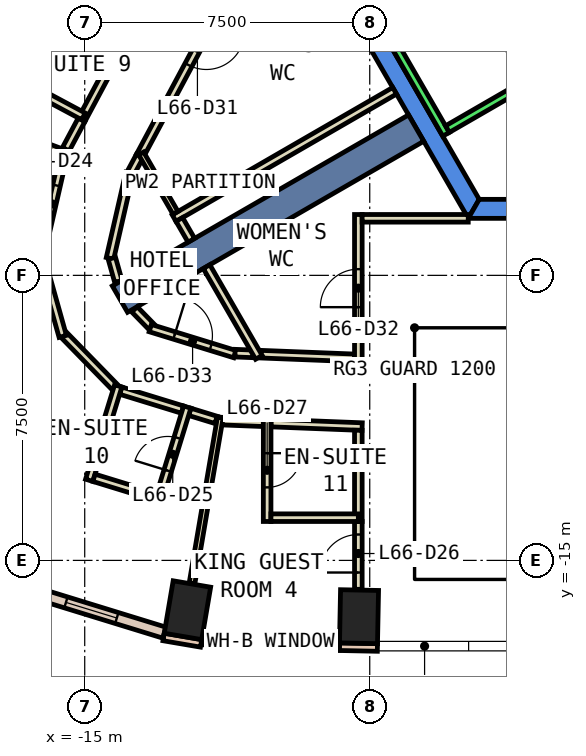
"""IFC4 building model, lengths in metres.
Left out: names, types, materials, properties, quantities, classifications, styles, units other than length and angle.
Written with IfcOpenShell. Run it as: python <this file> out.ifc"""

import sys

from ifc_helpers import new_model, si_unit, direction, frame, frame_2d, origin, origin_2d, place, context, subcontext, project, spatial, polyline, rectangle, outline, extrude, element, fill, save


model = new_model("IFC4")
c1 = context("Model", 3, precision=1e-05, world=origin(), true_north=direction((0.0, 1.0)))
c2 = subcontext(c1, "Body", "Model", "MODEL_VIEW")
j1 = project(units=[si_unit("LENGTHUNIT", "METRE"), si_unit("PLANEANGLEUNIT", "RADIAN")], contexts=[c1])
p1 = place(None, origin())
s1 = spatial("IfcSite", under=j1, at=p1, CompositionType="ELEMENT")
p2 = place(p1, origin())
s2 = spatial("IfcBuilding", under=s1, at=p2, CompositionType="ELEMENT")
p3 = place(p2, frame((0.0, 0.0, 286.4)))
s3 = spatial("IfcBuildingStorey", under=s2, at=p3, CompositionType="ELEMENT", Elevation=286.4)
for number, where, z_axis, x_axis in (
    (1, (-12.297, -16.311, 0.0), (0.0, 0.0, 1.0), (-0.986, 0.168, 0.0)),
    (2, (-7.782, -16.481, 0.0), (0.0, 0.0, 1.0), (-1.0, 0.02, 0.0)),
):
    element("IfcColumn", number, at=place(p3, frame(where, z_axis=z_axis, x_axis=x_axis)), inside=s3, PredefinedType="COLUMN", context=c2, shape_type="SweptSolid", body=[
        extrude(rectangle(XDim=1.0, YDim=1.4, at=origin_2d()), origin(), (0.0, 0.0, 1.0), 3.26),
    ])
p4 = place(p3, frame((0.0, 0.0, -0.6)))
e3 = element("IfcWall", 3, at=p4, inside=s3, PredefinedType="SHEAR", context=c2, shape_type="SweptSolid", body=[
    extrude(outline(polyline([(-9.815, 2.5), (-4.907, -6.0), (-4.619, -5.5), (-9.238, 2.5), (-9.815, 2.5)])), origin(), (0.0, 0.0, 1.0), 3.86),
])
p5 = place(p3, frame((0.0, 0.0, -0.6)))
e4 = element("IfcWall", 4, at=p5, inside=s3, PredefinedType="SHEAR", context=c2, shape_type="SweptSolid", body=[
    extrude(outline(polyline([(3.75, -6.0), (3.75, -5.5), (-4.619, -5.5), (-4.907, -6.0), (3.75, -6.0)])), origin(), (0.0, 0.0, 1.0), 3.86),
])
p6 = place(p3, frame((-6.279, -3.625, -0.6), z_axis=(0.0, 0.0, 1.0), x_axis=(-0.866017533419, -0.500013631625, 0.0)))
e5 = element("IfcWall", 5, at=p6, inside=s3, PredefinedType="SHEAR", context=c2, shape_type="SweptSolid", body=[
    extrude(rectangle(XDim=9.0, YDim=0.8, at=frame_2d((4.5, 0.0))), origin(), (0.0, 0.0, 1.0), 3.86),
])
for number, where, z_axis, x_axis in (
    (6, (-12.924, -17.015, 0.0), (0.0, 0.0, 1.0), (0.986, -0.168, 0.0)),
    (7, (-8.298, -17.271, 0.0), (0.0, 0.0, 1.0), (1.0, -0.02, 0.0)),
):
    element("IfcWall", number, at=place(p3, frame(where, z_axis=z_axis, x_axis=x_axis)), inside=s3, PredefinedType="STANDARD", context=c2, shape_type="SweptSolid", body=[
        extrude(rectangle(XDim=1.0, YDim=0.2, at=frame_2d((0.5, 0.0))), origin(), (0.0, 0.0, 1.0), 3.26),
    ])
p7 = place(p3, frame((-11.92, -17.069, 0.0), z_axis=(0.0, 0.0, 1.0), x_axis=(0.999234893779, -0.039110446866, 0.0)))
e8 = element("IfcWall", 8, at=p7, inside=s3, PredefinedType="STANDARD", context=c2, shape_type="SweptSolid", body=[
    extrude(rectangle(XDim=3.627, YDim=0.3, at=frame_2d((1.813, 0.0))), origin(), (0.0, 0.0, 1.0), 3.26),
])
p8 = place(p7, frame((1.113, 0.0, 0.9)))
e9 = element("IfcOpeningElement", 9, at=p8, cuts=e8, PredefinedType="OPENING", context=c2, shape_type="SweptSolid", body=[
    extrude(rectangle(XDim=1.4, YDim=2.0, at=frame_2d((0.7, 1.0))), frame((0.0, 0.16, 0.0), z_axis=(0.0, -1.0, 0.0), x_axis=(1.0, 0.0, 0.0)), (0.0, 0.0, 1.0), 0.32),
])
p9 = place(p3, frame((-16.746, -15.72, 0.0), z_axis=(0.0, 0.0, 1.0), x_axis=(0.955866957005, -0.293799864716, 0.0)))
e10 = element("IfcWall", 10, at=p9, inside=s3, PredefinedType="STANDARD", context=c2, shape_type="SweptSolid", body=[
    extrude(rectangle(XDim=4.02, YDim=0.3, at=frame_2d((2.01, 0.0))), origin(), (0.0, 0.0, 1.0), 3.26),
])
p10 = place(p9, frame((1.31, 0.0, 0.9)))
e11 = element("IfcOpeningElement", 11, at=p10, cuts=e10, PredefinedType="OPENING", context=c2, shape_type="SweptSolid", body=[
    extrude(rectangle(XDim=1.4, YDim=2.0, at=frame_2d((0.7, 1.0))), frame((0.0, 0.16, 0.0), z_axis=(0.0, -1.0, 0.0), x_axis=(1.0, 0.0, 0.0)), (0.0, 0.0, 1.0), 0.32),
])
p11 = place(p3, frame((-10.639, 1.084, 0.0), z_axis=(0.0, 0.0, 1.0), x_axis=(-0.471696599276, -0.881760918975, 0.0)))
e12 = element("IfcWall", 12, at=p11, inside=s3, PredefinedType="PARTITIONING", context=c2, shape_type="SweptSolid", body=[
    extrude(rectangle(XDim=6.172, YDim=0.2, at=frame_2d((3.086, 0.0))), origin(), (0.0, 0.0, 1.0), 3.26),
])
p12 = place(p11, frame((2.458, 0.0, 0.0)))
e13 = element("IfcOpeningElement", 13, at=p12, cuts=e12, PredefinedType="OPENING", context=c2, shape_type="SweptSolid", body=[
    extrude(rectangle(XDim=1.0, YDim=2.1, at=frame_2d((0.5, 1.05))), frame((0.0, 0.11, 0.0), z_axis=(0.0, -1.0, 0.0), x_axis=(1.0, 0.0, 0.0)), (0.0, 0.0, 1.0), 0.22),
])
p13 = place(p3, frame((-10.367, -9.574, 0.0), z_axis=(0.0, 0.0, 1.0), x_axis=(0.999229139158, -0.039257196264, 0.0)))
e14 = element("IfcWall", 14, at=p13, inside=s3, PredefinedType="PARTITIONING", context=c2, shape_type="SweptSolid", body=[
    extrude(rectangle(XDim=2.469, YDim=0.2, at=frame_2d((1.234, 0.0))), origin(), (0.0, 0.0, 1.0), 3.26),
])
p14 = place(p3, frame((-13.55, -4.358, 0.0), z_axis=(0.0, 0.0, 1.0), x_axis=(-0.472169364753, -0.881507850781, 0.0)))
e15 = element("IfcWall", 15, at=p14, inside=s3, PredefinedType="PARTITIONING", context=c2, shape_type="SweptSolid", body=[
    extrude(rectangle(XDim=0.521, YDim=0.2, at=frame_2d((0.26, 0.0))), origin(), (0.0, 0.0, 1.0), 3.26),
])
p15 = place(p3, frame((-13.821, -4.808, 0.0), z_axis=(0.0, 0.0, 1.0), x_axis=(-0.223248099856, -0.97476165595, 0.0)))
e16 = element("IfcWall", 16, at=p15, inside=s3, PredefinedType="PARTITIONING", context=c2, shape_type="SweptSolid", body=[
    extrude(rectangle(XDim=2.302, YDim=0.2, at=frame_2d((1.151, 0.0))), origin(), (0.0, 0.0, 1.0), 3.26),
])
p16 = place(p3, frame((-14.286, -7.051, 0.0), z_axis=(0.0, 0.0, 1.0), x_axis=(0.270633612894, -0.96268242301, 0.0)))
e17 = element("IfcWall", 17, at=p16, inside=s3, PredefinedType="PARTITIONING", context=c2, shape_type="SweptSolid", body=[
    extrude(rectangle(XDim=0.632, YDim=0.2, at=frame_2d((0.316, 0.0))), origin(), (0.0, 0.0, 1.0), 3.26),
])
p17 = place(p3, frame((-13.69, -8.395, 0.0), z_axis=(0.0, 0.0, 1.0), x_axis=(0.698333537371, -0.715772499181, 0.0)))
e18 = element("IfcWall", 18, at=p17, inside=s3, PredefinedType="PARTITIONING", context=c2, shape_type="SweptSolid", body=[
    extrude(rectangle(XDim=0.63, YDim=0.2, at=frame_2d((0.315, 0.0))), origin(), (0.0, 0.0, 1.0), 3.26),
])
p18 = place(p3, frame((-13.275, -8.888, 0.0), z_axis=(0.0, 0.0, 1.0), x_axis=(0.955792602122, -0.294041666654, 0.0)))
e19 = element("IfcWall", 19, at=p18, inside=s3, PredefinedType="PARTITIONING", context=c2, shape_type="SweptSolid", body=[
    extrude(rectangle(XDim=2.33, YDim=0.2, at=frame_2d((1.165, 0.0))), origin(), (0.0, 0.0, 1.0), 3.26),
])
p19 = place(p18, frame((0.665, 0.0, 0.0)))
e20 = element("IfcOpeningElement", 20, at=p19, cuts=e19, PredefinedType="OPENING", context=c2, shape_type="SweptSolid", body=[
    extrude(rectangle(XDim=1.0, YDim=2.1, at=frame_2d((0.5, 1.05))), frame((0.0, 0.11, 0.0), z_axis=(0.0, -1.0, 0.0), x_axis=(1.0, 0.0, 0.0)), (0.0, 0.0, 1.0), 0.22),
])
p20 = place(p3, frame((-11.044, -9.547, 0.0), z_axis=(0.0, 0.0, 1.0), x_axis=(0.999224473046, -0.039375785274, 0.0)))
e21 = element("IfcWall", 21, at=p20, inside=s3, PredefinedType="PARTITIONING", context=c2, shape_type="SweptSolid", body=[
    extrude(rectangle(XDim=0.478, YDim=0.2, at=frame_2d((0.239, 0.0))), origin(), (0.0, 0.0, 1.0), 3.26),
])
p21 = place(p3, frame((-15.496, -4.18, 0.0), z_axis=(0.0, 0.0, 1.0), x_axis=(0.471280380621, 0.881983448167, 0.0)))
e22 = element("IfcWall", 22, at=p21, inside=s3, PredefinedType="PARTITIONING", context=c2, shape_type="SweptSolid", body=[
    extrude(rectangle(XDim=0.879, YDim=0.2, at=frame_2d((0.439, 0.0))), origin(), (0.0, 0.0, 1.0), 3.26),
])
p22 = place(p3, frame((-15.082, -3.405, 0.0), z_axis=(0.0, 0.0, 1.0), x_axis=(0.471719946084, 0.88174842924, 0.0)))
e23 = element("IfcWall", 23, at=p22, inside=s3, PredefinedType="PARTITIONING", context=c2, shape_type="SweptSolid", body=[
    extrude(rectangle(XDim=3.0, YDim=0.2, at=frame_2d((1.5, 0.0))), origin(), (0.0, 0.0, 1.0), 3.26),
])
p23 = place(p3, frame((-11.544, -11.303, 0.0), z_axis=(0.0, 0.0, 1.0), x_axis=(-0.956186468463, 0.292758326147, 0.0)))
e24 = element("IfcWall", 24, at=p23, inside=s3, PredefinedType="PARTITIONING", context=c2, shape_type="SweptSolid", body=[
    extrude(rectangle(XDim=0.724, YDim=0.2, at=frame_2d((0.362, 0.0))), origin(), (0.0, 0.0, 1.0), 3.26),
])
p24 = place(p3, frame((-14.147, -10.503, 0.0), z_axis=(0.0, 0.0, 1.0), x_axis=(-0.698515752779, 0.715594677957, 0.0)))
e25 = element("IfcWall", 25, at=p24, inside=s3, PredefinedType="PARTITIONING", context=c2, shape_type="SweptSolid", body=[
    extrude(rectangle(XDim=1.987, YDim=0.2, at=frame_2d((0.994, 0.0))), origin(), (0.0, 0.0, 1.0), 3.26),
])
p25 = place(p3, frame((-15.578, -9.106, 0.0), z_axis=(0.0, 0.0, 1.0), x_axis=(-0.270688011946, 0.962667128445, 0.0)))
e26 = element("IfcWall", 26, at=p25, inside=s3, PredefinedType="PARTITIONING", context=c2, shape_type="SweptSolid", body=[
    extrude(rectangle(XDim=2.088, YDim=0.2, at=frame_2d((1.044, 0.0))), origin(), (0.0, 0.0, 1.0), 3.26),
])
p26 = place(p3, frame((-16.192, -7.098, 0.0), z_axis=(0.0, 0.0, 1.0), x_axis=(0.22330023395, 0.974749714295, 0.0)))
e27 = element("IfcWall", 27, at=p26, inside=s3, PredefinedType="PARTITIONING", context=c2, shape_type="SweptSolid", body=[
    extrude(rectangle(XDim=2.928, YDim=0.2, at=frame_2d((1.464, 0.0))), origin(), (0.0, 0.0, 1.0), 3.26),
])
p27 = place(p26, frame((1.014, 0.0, 0.0)))
e28 = element("IfcOpeningElement", 28, at=p27, cuts=e27, PredefinedType="OPENING", context=c2, shape_type="SweptSolid", body=[
    extrude(rectangle(XDim=1.0, YDim=2.1, at=frame_2d((0.5, 1.05))), frame((0.0, 0.11, 0.0), z_axis=(0.0, -1.0, 0.0), x_axis=(1.0, 0.0, 0.0)), (0.0, 0.0, 1.0), 0.22),
])
p28 = place(p3, frame((-12.427, -11.032, 0.0), z_axis=(0.0, 0.0, 1.0), x_axis=(-0.955940341053, 0.293561006177, 0.0)))
e29 = element("IfcWall", 29, at=p28, inside=s3, PredefinedType="PARTITIONING", context=c2, shape_type="SweptSolid", body=[
    extrude(rectangle(XDim=1.7, YDim=0.2, at=frame_2d((0.85, 0.0))), origin(), (0.0, 0.0, 1.0), 3.26),
])
p29 = place(p3, frame((-10.299, -11.378, 0.0), z_axis=(0.0, 0.0, 1.0), x_axis=(-0.999237995813, 0.03903111224, 0.0)))
e30 = element("IfcWall", 30, at=p29, inside=s3, PredefinedType="PARTITIONING", context=c2, shape_type="SweptSolid", body=[
    extrude(rectangle(XDim=1.176, YDim=0.2, at=frame_2d((0.588, 0.0))), origin(), (0.0, 0.0, 1.0), 3.26),
])
p30 = place(p3, frame((-7.7, -11.48, 0.0), z_axis=(0.0, 0.0, 1.0), x_axis=(-0.999233433291, 0.039147743138, 0.0)))
e31 = element("IfcWall", 31, at=p30, inside=s3, PredefinedType="PARTITIONING", context=c2, shape_type="SweptSolid", body=[
    extrude(rectangle(XDim=2.401, YDim=0.2, at=frame_2d((1.201, 0.0))), origin(), (0.0, 0.0, 1.0), 3.26),
])
p31 = place(p3, frame((-7.8, -9.775, 0.0), z_axis=(0.0, 0.0, 1.0), x_axis=(0.0, 1.0, 0.0)))
e32 = element("IfcWall", 32, at=p31, inside=s3, PredefinedType="PARTITIONING", context=c2, shape_type="SweptSolid", body=[
    extrude(rectangle(XDim=3.876, YDim=0.2, at=frame_2d((1.938, 0.0))), origin(), (0.0, 0.0, 1.0), 3.26),
])
p32 = place(p31, frame((1.438, 0.0, 0.0)))
e33 = element("IfcOpeningElement", 33, at=p32, cuts=e32, PredefinedType="OPENING", context=c2, shape_type="SweptSolid", body=[
    extrude(rectangle(XDim=1.0, YDim=2.1, at=frame_2d((0.5, 1.05))), frame((0.0, 0.11, 0.0), z_axis=(0.0, -1.0, 0.0), x_axis=(1.0, 0.0, 0.0)), (0.0, 0.0, 1.0), 0.22),
])
p33 = place(p3, frame((-7.7, -5.999, 0.0), z_axis=(0.0, 0.0, 1.0), x_axis=(1.0, 0.0, 0.0)))
e34 = element("IfcWall", 34, at=p33, inside=s3, PredefinedType="PARTITIONING", context=c2, shape_type="SweptSolid", body=[
    extrude(rectangle(XDim=2.792, YDim=0.2, at=frame_2d((1.396, 0.0))), origin(), (0.0, 0.0, 1.0), 3.26),
])
p34 = place(p3, frame((-7.8, -15.761, 0.0), z_axis=(0.0, 0.0, 1.0), x_axis=(0.0, 1.0, 0.0)))
e35 = element("IfcWall", 35, at=p34, inside=s3, PredefinedType="PARTITIONING", context=c2, shape_type="SweptSolid", body=[
    extrude(rectangle(XDim=1.785, YDim=0.2, at=frame_2d((0.893, 0.0))), origin(), (0.0, 0.0, 1.0), 3.26),
])
p35 = place(p34, frame((0.442, 0.0, 0.0)))
e36 = element("IfcOpeningElement", 36, at=p35, cuts=e35, PredefinedType="OPENING", context=c2, shape_type="SweptSolid", body=[
    extrude(rectangle(XDim=1.0, YDim=2.1, at=frame_2d((0.5, 1.05))), frame((0.0, 0.11, 0.0), z_axis=(0.0, -1.0, 0.0), x_axis=(1.0, 0.0, 0.0)), (0.0, 0.0, 1.0), 0.22),
])
p36 = place(p3, frame((-7.8, -13.976, 0.0), z_axis=(0.0, 0.0, 1.0), x_axis=(0.0, 1.0, 0.0)))
e37 = element("IfcWall", 37, at=p36, inside=s3, PredefinedType="PARTITIONING", context=c2, shape_type="SweptSolid", body=[
    extrude(rectangle(XDim=2.4, YDim=0.2, at=frame_2d((1.2, 0.0))), origin(), (0.0, 0.0, 1.0), 3.26),
])
p37 = place(p3, frame((-6.845, -2.643, 0.0), z_axis=(0.0, 0.0, 1.0), x_axis=(-0.865994457699, -0.500053596362, 0.0)))
e38 = element("IfcWall", 38, at=p37, inside=s3, PredefinedType="PARTITIONING", context=c2, shape_type="SweptSolid", body=[
    extrude(rectangle(XDim=6.701, YDim=0.2, at=frame_2d((3.351, 0.0))), origin(), (0.0, 0.0, 1.0), 3.26),
])
p38 = place(p3, frame((-12.611, -5.857, 0.0), z_axis=(0.0, 0.0, 1.0), x_axis=(-0.500120037633, 0.865956088932, 0.0)))
e39 = element("IfcWall", 39, at=p38, inside=s3, PredefinedType="PARTITIONING", context=c2, shape_type="SweptSolid", body=[
    extrude(rectangle(XDim=1.807, YDim=0.15, at=frame_2d((0.904, 0.0))), origin(), (0.0, 0.0, 1.0), 3.26),
])
p39 = place(p3, frame((-10.417, -9.657, 0.0), z_axis=(0.0, 0.0, 1.0), x_axis=(-0.499837531988, 0.866119184418, 0.0)))
e40 = element("IfcWall", 40, at=p39, inside=s3, PredefinedType="PARTITIONING", context=c2, shape_type="SweptSolid", body=[
    extrude(rectangle(XDim=2.755, YDim=0.2, at=frame_2d((1.377, 0.0))), origin(), (0.0, 0.0, 1.0), 3.26),
])
p40 = place(p3, frame((-15.865, 0.643, 0.0), z_axis=(0.0, 0.0, 1.0), x_axis=(-0.471677088066, -0.881771356188, 0.0)))
e41 = element("IfcWall", 41, at=p40, inside=s3, PredefinedType="PARTITIONING", context=c2, shape_type="SweptSolid", body=[
    extrude(rectangle(XDim=3.199, YDim=0.2, at=frame_2d((1.6, 0.0))), origin(), (0.0, 0.0, 1.0), 3.26),
])
p41 = place(p40, frame((1.15, 0.0, 0.0)))
e42 = element("IfcOpeningElement", 42, at=p41, cuts=e41, PredefinedType="OPENING", context=c2, shape_type="SweptSolid", body=[
    extrude(rectangle(XDim=0.9, YDim=2.1, at=frame_2d((0.45, 1.05))), frame((0.0, 0.11, 0.0), z_axis=(0.0, -1.0, 0.0), x_axis=(1.0, 0.0, 0.0)), (0.0, 0.0, 1.0), 0.22),
])
p42 = place(p3, frame((-17.239, -2.137, 0.0), z_axis=(0.0, 0.0, 1.0), x_axis=(0.881706262609, -0.471798756332, 0.0)))
e43 = element("IfcWall", 43, at=p42, inside=s3, PredefinedType="PARTITIONING", context=c2, shape_type="SweptSolid", body=[
    extrude(rectangle(XDim=2.501, YDim=0.2, at=frame_2d((1.25, 0.0))), origin(), (0.0, 0.0, 1.0), 3.26),
])
p43 = place(p3, frame((-15.45, -4.304, 0.0), z_axis=(0.0, 0.0, 1.0), x_axis=(-0.936458128132, 0.350779381172, 0.0)))
e44 = element("IfcWall", 44, at=p43, inside=s3, PredefinedType="PARTITIONING", context=c2, shape_type="SweptSolid", body=[
    extrude(rectangle(XDim=4.433, YDim=0.15, at=frame_2d((2.216, 0.0))), origin(), (0.0, 0.0, 1.0), 3.26),
])
p44 = place(p3, frame((-14.118, -10.408, 0.0), z_axis=(0.0, 0.0, 1.0), x_axis=(-0.293914282011, -0.955831781659, 0.0)))
e45 = element("IfcWall", 45, at=p44, inside=s3, PredefinedType="PARTITIONING", context=c2, shape_type="SweptSolid", body=[
    extrude(rectangle(XDim=2.6, YDim=0.2, at=frame_2d((1.3, 0.0))), origin(), (0.0, 0.0, 1.0), 3.26),
])
p45 = place(p3, frame((-14.757, -12.827, 0.0), z_axis=(0.0, 0.0, 1.0), x_axis=(0.955940341053, -0.293561006177, 0.0)))
e46 = element("IfcWall", 46, at=p45, inside=s3, PredefinedType="PARTITIONING", context=c2, shape_type="SweptSolid", body=[
    extrude(rectangle(XDim=1.7, YDim=0.2, at=frame_2d((0.85, 0.0))), origin(), (0.0, 0.0, 1.0), 3.26),
])
p46 = place(p3, frame((-13.066, -13.451, 0.0), z_axis=(0.0, 0.0, 1.0), x_axis=(0.293854864179, 0.955850050373, 0.0)))
e47 = element("IfcWall", 47, at=p46, inside=s3, PredefinedType="PARTITIONING", context=c2, shape_type="SweptSolid", body=[
    extrude(rectangle(XDim=2.6, YDim=0.2, at=frame_2d((1.3, 0.0))), origin(), (0.0, 0.0, 1.0), 3.26),
])
p47 = place(p46, frame((0.85, 0.0, 0.0)))
e48 = element("IfcOpeningElement", 48, at=p47, cuts=e47, PredefinedType="OPENING", context=c2, shape_type="SweptSolid", body=[
    extrude(rectangle(XDim=0.9, YDim=2.1, at=frame_2d((0.45, 1.05))), frame((0.0, 0.11, 0.0), z_axis=(0.0, -1.0, 0.0), x_axis=(1.0, 0.0, 0.0)), (0.0, 0.0, 1.0), 0.22),
])
p48 = place(p3, frame((-11.432, -11.234, 0.0), z_axis=(0.0, 0.0, 1.0), x_axis=(-0.16797255243, -0.98579167253, 0.0)))
e49 = element("IfcWall", 49, at=p48, inside=s3, PredefinedType="PARTITIONING", context=c2, shape_type="SweptSolid", body=[
    extrude(rectangle(XDim=4.43, YDim=0.15, at=frame_2d((2.215, 0.0))), origin(), (0.0, 0.0, 1.0), 3.26),
])
p49 = place(p3, frame((-10.199, -11.282, 0.0), z_axis=(0.0, 0.0, 1.0), x_axis=(-0.000362482985, -0.999999934303, 0.0)))
e50 = element("IfcWall", 50, at=p49, inside=s3, PredefinedType="PARTITIONING", context=c2, shape_type="SweptSolid", body=[
    extrude(rectangle(XDim=2.694, YDim=0.2, at=frame_2d((1.347, 0.0))), origin(), (0.0, 0.0, 1.0), 3.26),
])
p50 = place(p49, frame((0.897, 0.0, 0.0)))
e51 = element("IfcOpeningElement", 51, at=p50, cuts=e50, PredefinedType="OPENING", context=c2, shape_type="SweptSolid", body=[
    extrude(rectangle(XDim=0.9, YDim=2.1, at=frame_2d((0.45, 1.05))), frame((0.0, 0.11, 0.0), z_axis=(0.0, -1.0, 0.0), x_axis=(1.0, 0.0, 0.0)), (0.0, 0.0, 1.0), 0.22),
])
p51 = place(p3, frame((-10.1, -13.876, 0.0), z_axis=(0.0, 0.0, 1.0), x_axis=(1.0, 0.0, 0.0)))
e52 = element("IfcWall", 52, at=p51, inside=s3, PredefinedType="PARTITIONING", context=c2, shape_type="SweptSolid", body=[
    extrude(rectangle(XDim=2.3, YDim=0.2, at=frame_2d((1.15, 0.0))), origin(), (0.0, 0.0, 1.0), 3.26),
])
p52 = place(p3, frame((-12.194, -6.578, 0.0), z_axis=(0.0, 0.0, 1.0), x_axis=(-0.500701704226, 0.865619895442, 0.0)))
e53 = element("IfcWall", 53, at=p52, inside=s3, PredefinedType="PARTITIONING", context=c2, shape_type="SweptSolid", body=[
    extrude(rectangle(XDim=0.633, YDim=0.2, at=frame_2d((0.316, 0.0))), origin(), (0.0, 0.0, 1.0), 3.26),
])
p53 = place(p3, frame((-5.94, 2.188, 0.0), z_axis=(0.0, 0.0, 1.0), x_axis=(0.500034260056, -0.866005622828, 0.0)))
e54 = element("IfcWall", 54, at=p53, inside=s3, PredefinedType="STANDARD", context=c2, shape_type="SweptSolid", body=[
    extrude(rectangle(XDim=5.399, YDim=0.2, at=frame_2d((2.7, 0.0))), origin(), (0.0, 0.0, 1.0), 3.26),
])
p54 = place(p53, frame((3.075, 0.0, 0.0)))
e55 = element("IfcOpeningElement", 55, at=p54, cuts=e54, PredefinedType="OPENING", context=c2, shape_type="SweptSolid", body=[
    extrude(rectangle(XDim=1.1, YDim=2.1, at=frame_2d((0.55, 1.05))), frame((0.0, 0.11, 0.0), z_axis=(0.0, -1.0, 0.0), x_axis=(1.0, 0.0, 0.0)), (0.0, 0.0, 1.0), 0.22),
])
p55 = place(p53, frame((1.225, 0.0, 0.0)))
e56 = element("IfcOpeningElement", 56, at=p55, cuts=e54, PredefinedType="OPENING", context=c2, shape_type="SweptSolid", body=[
    extrude(rectangle(XDim=1.1, YDim=2.1, at=frame_2d((0.55, 1.05))), frame((0.0, 0.11, 0.0), z_axis=(0.0, -1.0, 0.0), x_axis=(1.0, 0.0, 0.0)), (0.0, 0.0, 1.0), 0.22),
])
p56 = place(p3, frame((-8.192, 0.888, 0.0), z_axis=(0.0, 0.0, 1.0), x_axis=(0.500034260056, -0.866005622828, 0.0)))
e57 = element("IfcWall", 57, at=p56, inside=s3, PredefinedType="STANDARD", context=c2, shape_type="SweptSolid", body=[
    extrude(rectangle(XDim=5.399, YDim=0.2, at=frame_2d((2.7, 0.0))), origin(), (0.0, 0.0, 1.0), 3.26),
])
p57 = place(p3, frame((-3.377, -2.452, 0.0), z_axis=(0.0, 0.0, 1.0), x_axis=(-0.865955154139, -0.50012165622, 0.0)))
e58 = element("IfcWall", 58, at=p57, inside=s3, PredefinedType="STANDARD", context=c2, shape_type="SweptSolid", body=[
    extrude(rectangle(XDim=2.4, YDim=0.2, at=frame_2d((1.2, 0.0))), origin(), (0.0, 0.0, 1.0), 3.26),
])
p58 = place(p8, origin())
e59 = element("IfcWindow", 59, at=p58, inside=s3, PartitioningType="SINGLE_PANEL", PredefinedType="WINDOW", context=c2, shape_type="SweptSolid", body=[
    extrude(rectangle(XDim=1.4, YDim=2.0, at=frame_2d((0.7, 1.0))), frame((0.0, 0.03, 0.0), z_axis=(0.0, -1.0, 0.0), x_axis=(1.0, 0.0, 0.0)), (0.0, 0.0, 1.0), 0.06),
])
fill(e9, e59)
p59 = place(p10, origin())
e60 = element("IfcWindow", 60, at=p59, inside=s3, PartitioningType="SINGLE_PANEL", PredefinedType="WINDOW", context=c2, shape_type="SweptSolid", body=[
    extrude(rectangle(XDim=1.4, YDim=2.0, at=frame_2d((0.7, 1.0))), frame((0.0, 0.03, 0.0), z_axis=(0.0, -1.0, 0.0), x_axis=(1.0, 0.0, 0.0)), (0.0, 0.0, 1.0), 0.06),
])
fill(e11, e60)
p60 = place(p27, origin())
e61 = element("IfcDoor", 61, at=p60, inside=s3, OperationType="SINGLE_SWING_LEFT", PredefinedType="DOOR", context=c2, shape_type="SweptSolid", body=[
    extrude(rectangle(XDim=1.0, YDim=2.1, at=frame_2d((0.5, 1.05))), frame((0.0, 0.025, 0.0), z_axis=(0.0, -1.0, 0.0), x_axis=(1.0, 0.0, 0.0)), (0.0, 0.0, 1.0), 0.05),
])
fill(e28, e61)
p61 = place(p47, origin())
e62 = element("IfcDoor", 62, at=p61, inside=s3, OperationType="SINGLE_SWING_LEFT", PredefinedType="DOOR", context=c2, shape_type="SweptSolid", body=[
    extrude(rectangle(XDim=0.9, YDim=2.1, at=frame_2d((0.45, 1.05))), frame((0.0, 0.025, 0.0), z_axis=(0.0, -1.0, 0.0), x_axis=(1.0, 0.0, 0.0)), (0.0, 0.0, 1.0), 0.05),
])
fill(e48, e62)
p62 = place(p35, origin())
e63 = element("IfcDoor", 63, at=p62, inside=s3, OperationType="SINGLE_SWING_RIGHT", PredefinedType="DOOR", context=c2, shape_type="SweptSolid", body=[
    extrude(rectangle(XDim=1.0, YDim=2.1, at=frame_2d((0.5, 1.05))), frame((0.0, 0.025, 0.0), z_axis=(0.0, -1.0, 0.0), x_axis=(1.0, 0.0, 0.0)), (0.0, 0.0, 1.0), 0.05),
])
fill(e36, e63)
p63 = place(p50, origin())
e64 = element("IfcDoor", 64, at=p63, inside=s3, OperationType="SINGLE_SWING_LEFT", PredefinedType="DOOR", context=c2, shape_type="SweptSolid", body=[
    extrude(rectangle(XDim=0.9, YDim=2.1, at=frame_2d((0.45, 1.05))), frame((0.0, 0.025, 0.0), z_axis=(0.0, -1.0, 0.0), x_axis=(1.0, 0.0, 0.0)), (0.0, 0.0, 1.0), 0.05),
])
fill(e51, e64)
p64 = place(p12, origin())
e65 = element("IfcDoor", 65, at=p64, inside=s3, OperationType="SINGLE_SWING_LEFT", PredefinedType="DOOR", context=c2, shape_type="SweptSolid", body=[
    extrude(rectangle(XDim=1.0, YDim=2.1, at=frame_2d((0.5, 1.05))), frame((0.0, 0.025, 0.0), z_axis=(0.0, -1.0, 0.0), x_axis=(1.0, 0.0, 0.0)), (0.0, 0.0, 1.0), 0.05),
])
fill(e13, e65)
p65 = place(p32, origin())
e66 = element("IfcDoor", 66, at=p65, inside=s3, OperationType="SINGLE_SWING_LEFT", PredefinedType="DOOR", context=c2, shape_type="SweptSolid", body=[
    extrude(rectangle(XDim=1.0, YDim=2.1, at=frame_2d((0.5, 1.05))), frame((0.0, 0.025, 0.0), z_axis=(0.0, -1.0, 0.0), x_axis=(1.0, 0.0, 0.0)), (0.0, 0.0, 1.0), 0.05),
])
fill(e33, e66)
p66 = place(p19, origin())
e67 = element("IfcDoor", 67, at=p66, inside=s3, OperationType="SINGLE_SWING_LEFT", PredefinedType="DOOR", context=c2, shape_type="SweptSolid", body=[
    extrude(rectangle(XDim=1.0, YDim=2.1, at=frame_2d((0.5, 1.05))), frame((0.0, 0.025, 0.0), z_axis=(0.0, -1.0, 0.0), x_axis=(1.0, 0.0, 0.0)), (0.0, 0.0, 1.0), 0.05),
])
fill(e20, e67)
save(model, sys.argv[1])
